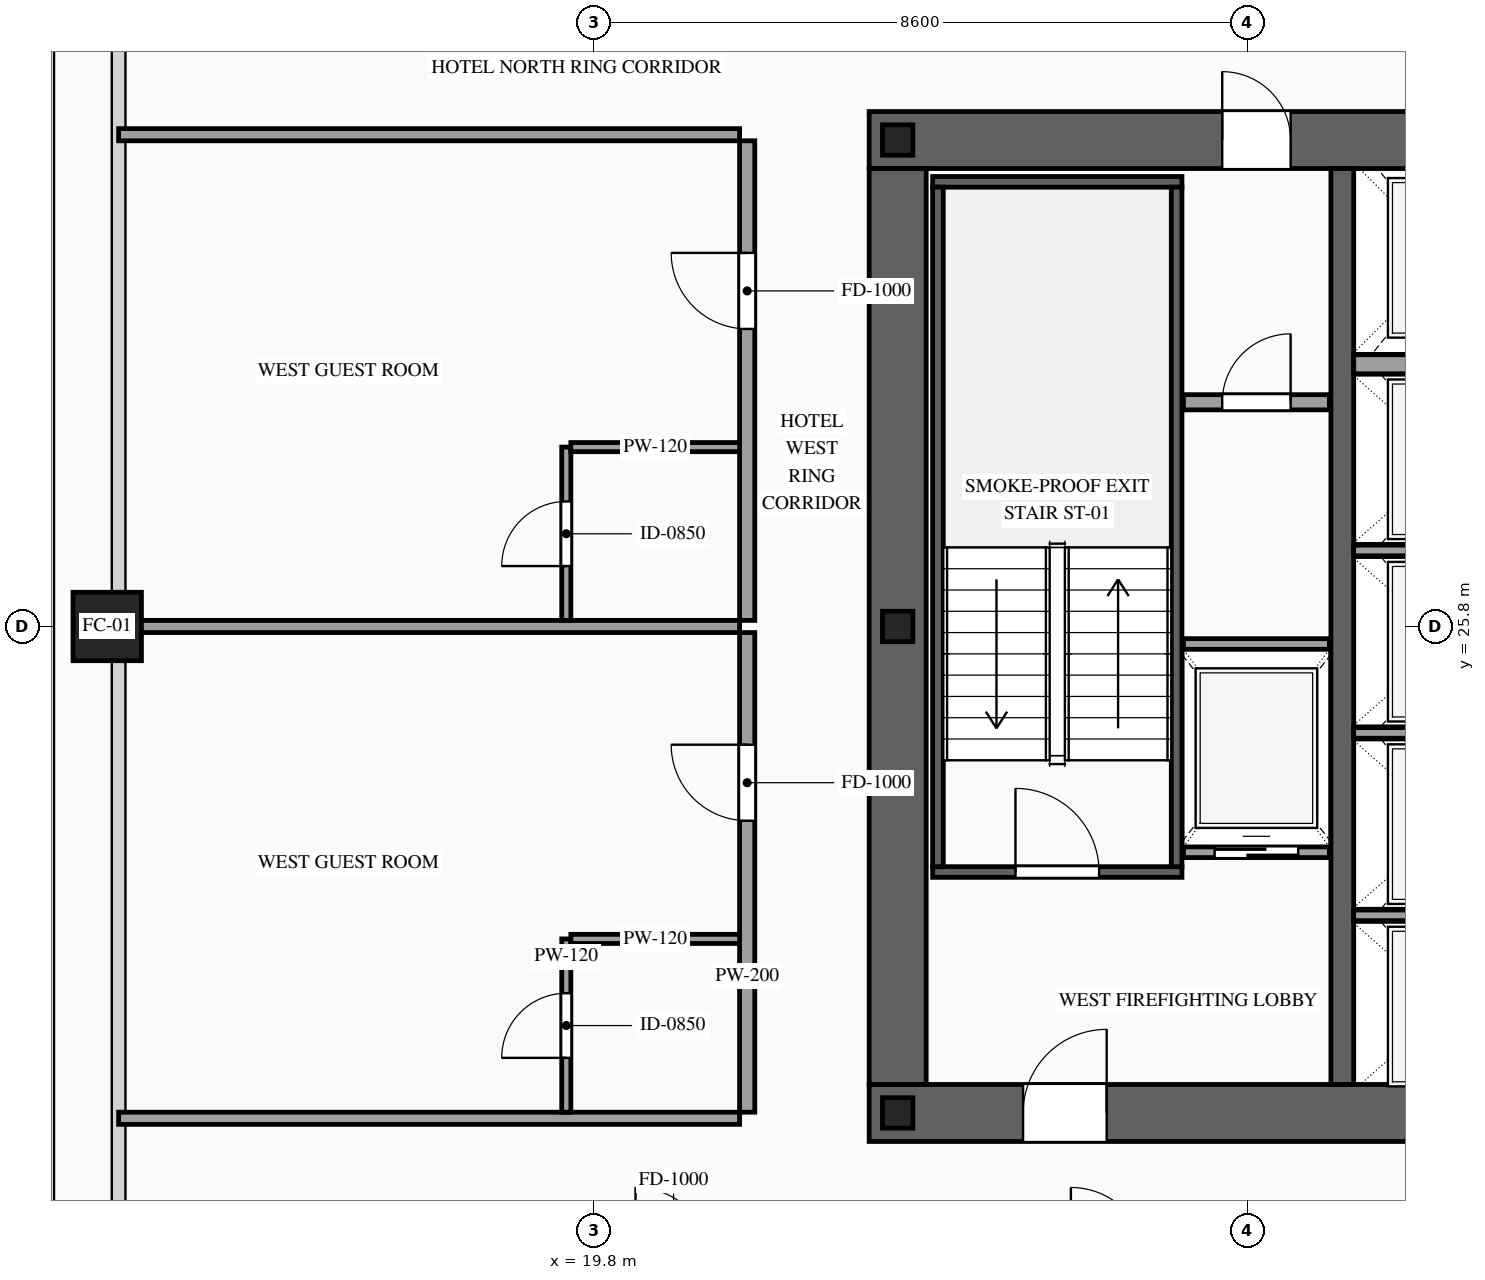
"""IFC4 building model, lengths in metres.
Left out: names, types, materials, properties, quantities, classifications, styles, units other than length and angle.
Written with IfcOpenShell. Run it as: python <this file> out.ifc"""

import sys

from ifc_helpers import new_model, si_unit, direction, frame, frame_2d, origin, origin_2d, place, context, subcontext, project, spatial, rectangle, hollow_rectangle, i_section, extrude, source, transform, mapped, element, fill, save


model = new_model("IFC4")
c1 = context("Model", 3, precision=1e-05, world=origin(), true_north=direction((0.0, 1.0)))
c2 = subcontext(c1, "Body", "Model", "MODEL_VIEW")
j1 = project(units=[si_unit("LENGTHUNIT", "METRE"), si_unit("PLANEANGLEUNIT", "RADIAN")], contexts=[c1])
p1 = place(None, origin())
s1 = spatial("IfcSite", under=j1, at=p1, CompositionType="ELEMENT")
p2 = place(p1, origin())
s2 = spatial("IfcBuilding", under=s1, at=p2, CompositionType="ELEMENT")
p3 = place(p2, frame((0.0, 0.0, 163.2)))
s3 = spatial("IfcBuildingStorey", under=s2, at=p3, CompositionType="ELEMENT", Elevation=163.2)
p4 = place(p3, frame((23.425, 19.4, 0.0), z_axis=(0.0, 0.0, 1.0), x_axis=(1.0, 0.0, 0.0)))
e1 = element("IfcWall", 1, at=p4, inside=s3, PredefinedType="SHEAR", context=c2, shape_type="SweptSolid", body=[
    extrude(rectangle(XDim=27.15, YDim=0.75, at=frame_2d((13.575, 0.0))), origin(), (0.0, 0.0, 1.0), 3.6),
])
p5 = place(p4, frame((2.025, 0.0, 0.0)))
e2 = element("IfcOpeningElement", 2, at=p5, cuts=e1, PredefinedType="OPENING", context=c2, shape_type="SweptSolid", body=[
    extrude(rectangle(XDim=1.1, YDim=2.2, at=frame_2d((0.55, 1.1))), frame((0.0, 0.39, 0.0), z_axis=(0.0, -1.0, 0.0), x_axis=(1.0, 0.0, 0.0)), (0.0, 0.0, 1.0), 0.78),
])
p6 = place(p4, frame((9.925, 0.0, 0.0)))
e3 = element("IfcOpeningElement", 3, at=p6, cuts=e1, PredefinedType="OPENING", context=c2, shape_type="SweptSolid", body=[
    extrude(rectangle(XDim=1.1, YDim=2.2, at=frame_2d((0.55, 1.1))), frame((0.0, 0.39, 0.0), z_axis=(0.0, -1.0, 0.0), x_axis=(1.0, 0.0, 0.0)), (0.0, 0.0, 1.0), 0.78),
])
p7 = place(p4, frame((23.125, 0.0, 0.0)))
e4 = element("IfcOpeningElement", 4, at=p7, cuts=e1, PredefinedType="OPENING", context=c2, shape_type="SweptSolid", body=[
    extrude(rectangle(XDim=1.1, YDim=2.2, at=frame_2d((0.55, 1.1))), frame((0.0, 0.39, 0.0), z_axis=(0.0, -1.0, 0.0), x_axis=(1.0, 0.0, 0.0)), (0.0, 0.0, 1.0), 0.78),
])
p8 = place(p4, frame((19.745, 0.0, 0.0)))
e5 = element("IfcOpeningElement", 5, at=p8, cuts=e1, PredefinedType="OPENING", context=c2, shape_type="SweptSolid", body=[
    extrude(rectangle(XDim=0.9, YDim=2.15, at=frame_2d((0.45, 1.075))), frame((0.0, 0.39, 0.0), z_axis=(0.0, -1.0, 0.0), x_axis=(1.0, 0.0, 0.0)), (0.0, 0.0, 1.0), 0.78),
])
p9 = place(p4, frame((18.305, 0.0, 0.0)))
e6 = element("IfcOpeningElement", 6, at=p9, cuts=e1, PredefinedType="OPENING", context=c2, shape_type="SweptSolid", body=[
    extrude(rectangle(XDim=0.9, YDim=2.15, at=frame_2d((0.45, 1.075))), frame((0.0, 0.39, 0.0), z_axis=(0.0, -1.0, 0.0), x_axis=(1.0, 0.0, 0.0)), (0.0, 0.0, 1.0), 0.78),
])
p10 = place(p3, frame((23.425, 32.2, 0.0), z_axis=(0.0, 0.0, 1.0), x_axis=(1.0, 0.0, 0.0)))
e7 = element("IfcWall", 7, at=p10, inside=s3, PredefinedType="SHEAR", context=c2, shape_type="SweptSolid", body=[
    extrude(rectangle(XDim=27.15, YDim=0.75, at=frame_2d((13.575, 0.0))), origin(), (0.0, 0.0, 1.0), 3.6),
])
p11 = place(p10, frame((4.645, 0.0, 0.0)))
e8 = element("IfcOpeningElement", 8, at=p11, cuts=e7, PredefinedType="OPENING", context=c2, shape_type="SweptSolid", body=[
    extrude(rectangle(XDim=0.9, YDim=2.15, at=frame_2d((0.45, 1.075))), frame((0.0, 0.39, 0.0), z_axis=(0.0, -1.0, 0.0), x_axis=(1.0, 0.0, 0.0)), (0.0, 0.0, 1.0), 0.78),
])
p12 = place(p10, frame((9.925, 0.0, 0.0)))
e9 = element("IfcOpeningElement", 9, at=p12, cuts=e7, PredefinedType="OPENING", context=c2, shape_type="SweptSolid", body=[
    extrude(rectangle(XDim=1.1, YDim=2.2, at=frame_2d((0.55, 1.1))), frame((0.0, 0.39, 0.0), z_axis=(0.0, -1.0, 0.0), x_axis=(1.0, 0.0, 0.0)), (0.0, 0.0, 1.0), 0.78),
])
p13 = place(p10, frame((15.775, 0.0, 0.0)))
e10 = element("IfcOpeningElement", 10, at=p13, cuts=e7, PredefinedType="OPENING", context=c2, shape_type="SweptSolid", body=[
    extrude(rectangle(XDim=1.1, YDim=2.2, at=frame_2d((0.55, 1.1))), frame((0.0, 0.39, 0.0), z_axis=(0.0, -1.0, 0.0), x_axis=(1.0, 0.0, 0.0)), (0.0, 0.0, 1.0), 0.78),
])
p14 = place(p10, frame((18.305, 0.0, 0.0)))
e11 = element("IfcOpeningElement", 11, at=p14, cuts=e7, PredefinedType="OPENING", context=c2, shape_type="SweptSolid", body=[
    extrude(rectangle(XDim=0.9, YDim=2.15, at=frame_2d((0.45, 1.075))), frame((0.0, 0.39, 0.0), z_axis=(0.0, -1.0, 0.0), x_axis=(1.0, 0.0, 0.0)), (0.0, 0.0, 1.0), 0.78),
])
p15 = place(p10, frame((19.745, 0.0, 0.0)))
e12 = element("IfcOpeningElement", 12, at=p15, cuts=e7, PredefinedType="OPENING", context=c2, shape_type="SweptSolid", body=[
    extrude(rectangle(XDim=0.9, YDim=2.15, at=frame_2d((0.45, 1.075))), frame((0.0, 0.39, 0.0), z_axis=(0.0, -1.0, 0.0), x_axis=(1.0, 0.0, 0.0)), (0.0, 0.0, 1.0), 0.78),
])
m1 = source(origin(), c2, "Body", "SweptSolid", [
    extrude(rectangle(XDim=12.05, YDim=0.75, at=frame_2d((6.025, 0.0))), origin(), (0.0, 0.0, 1.0), 3.6),
])
p16 = place(p3, frame((23.8, 19.775, 0.0), z_axis=(0.0, 0.0, 1.0), x_axis=(0.0, 1.0, 0.0)))
e13 = element("IfcWall", 13, at=p16, inside=s3, PredefinedType="SHEAR", context=c2, shape_type="MappedRepresentation", body=[
    mapped(m1, transform((0.0, 0.0, 0.0), scale=1.0)),
])
m2 = source(origin(), c2, "Body", "SweptSolid", [
    extrude(rectangle(XDim=12.05, YDim=0.3, at=frame_2d((6.025, 0.0))), origin(), (0.0, 0.0, 1.0), 3.6),
])
p17 = place(p3, frame((29.65, 19.775, 0.0), z_axis=(0.0, 0.0, 1.0), x_axis=(0.0, 1.0, 0.0)))
e14 = element("IfcWall", 14, at=p17, inside=s3, PredefinedType="SOLIDWALL", context=c2, shape_type="MappedRepresentation", body=[
    mapped(m2, transform((0.0, 0.0, 0.0), scale=1.0)),
])
m3 = source(origin(), c2, "Body", "SweptSolid", [
    extrude(i_section(OverallWidth=0.4, OverallDepth=0.4, WebThickness=0.013, FlangeThickness=0.021, at=origin_2d()), origin(), (0.0, 0.0, 1.0), 3.6),
])
for number, where, z_axis, x_axis in (
    (15, (23.8, 19.4, 0.0), (0.0, 0.0, 1.0), (1.0, 0.0, 0.0)),
    (16, (23.8, 25.8, 0.0), (0.0, 0.0, 1.0), (1.0, 0.0, 0.0)),
    (17, (23.8, 32.2, 0.0), (0.0, 0.0, 1.0), (1.0, 0.0, 0.0)),
):
    element("IfcColumn", number, at=place(p3, frame(where, z_axis=z_axis, x_axis=x_axis)), inside=s3, PredefinedType="COLUMN", context=c2, shape_type="MappedRepresentation", body=[
        mapped(m3, transform((0.0, 0.0, 0.0), scale=1.0)),
    ])
m4 = source(origin(), c2, "Body", "SweptSolid", [
    extrude(hollow_rectangle(XDim=0.9, YDim=0.9, WallThickness=0.042, at=origin_2d()), origin(), (0.0, 0.0, 1.0), 3.3),
])
p18 = place(p3, frame((13.4, 25.8, 0.0), z_axis=(0.0, 0.0, 1.0), x_axis=(1.0, 0.0, 0.0)))
e18 = element("IfcColumn", 18, at=p18, inside=s3, PredefinedType="COLUMN", context=c2, shape_type="MappedRepresentation", body=[
    mapped(m4, transform((0.0, 0.0, 0.0), scale=1.0)),
])
p19 = place(p3, frame((27.56, 22.83, 0.0), z_axis=(0.0, 0.0, 1.0), x_axis=(1.0, 0.0, 0.0)))
e19 = element("IfcWall", 19, at=p19, inside=s3, PredefinedType="SOLIDWALL", context=c2, shape_type="SweptSolid", body=[
    extrude(rectangle(XDim=1.92, YDim=0.14, at=frame_2d((0.96, 0.0))), origin(), (0.0, 0.0, 1.0), 3.3),
])
p20 = place(p19, frame((0.41, 0.0, 0.0)))
e20 = element("IfcOpeningElement", 20, at=p20, cuts=e19, PredefinedType="OPENING", context=c2, shape_type="SweptSolid", body=[
    extrude(rectangle(XDim=1.1, YDim=2.2, at=frame_2d((0.55, 1.1))), frame((0.0, 0.085, 0.0), z_axis=(0.0, -1.0, 0.0), x_axis=(1.0, 0.0, 0.0)), (0.0, 0.0, 1.0), 0.17),
])
m5 = source(origin(), c2, "Body", "SweptSolid", [
    extrude(rectangle(XDim=1.92, YDim=0.14, at=frame_2d((0.96, 0.0))), origin(), (0.0, 0.0, 1.0), 3.3),
])
p21 = place(p3, frame((27.56, 25.57, 0.0), z_axis=(0.0, 0.0, 1.0), x_axis=(1.0, 0.0, 0.0)))
e21 = element("IfcWall", 21, at=p21, inside=s3, PredefinedType="SOLIDWALL", context=c2, shape_type="MappedRepresentation", body=[
    mapped(m5, transform((0.0, 0.0, 0.0), scale=1.0)),
])
m6 = source(origin(), c2, "Body", "SweptSolid", [
    extrude(rectangle(XDim=2.5, YDim=0.14, at=frame_2d((1.25, 0.0))), origin(), (0.0, 0.0, 1.0), 3.3),
])
for number, where, z_axis, x_axis in (
    (22, (29.8, 22.0, 0.0), (0.0, 0.0, 1.0), (1.0, 0.0, 0.0)),
    (23, (29.8, 24.4, 0.0), (0.0, 0.0, 1.0), (1.0, 0.0, 0.0)),
    (24, (29.8, 26.8, 0.0), (0.0, 0.0, 1.0), (1.0, 0.0, 0.0)),
):
    element("IfcWall", number, at=place(p3, frame(where, z_axis=z_axis, x_axis=x_axis)), inside=s3, PredefinedType="SOLIDWALL", context=c2, shape_type="MappedRepresentation", body=[
        mapped(m6, transform((0.0, 0.0, 0.0), scale=1.0)),
    ])
m7 = source(origin(), c2, "Body", "SweptSolid", [
    extrude(rectangle(XDim=2.5, YDim=0.25, at=frame_2d((1.25, 0.0))), origin(), (0.0, 0.0, 1.0), 3.3),
])
p22 = place(p3, frame((29.8, 29.25, 0.0), z_axis=(0.0, 0.0, 1.0), x_axis=(1.0, 0.0, 0.0)))
e25 = element("IfcWall", 25, at=p22, inside=s3, PredefinedType="SOLIDWALL", context=c2, shape_type="MappedRepresentation", body=[
    mapped(m7, transform((0.0, 0.0, 0.0), scale=1.0)),
])
p23 = place(p3, frame((24.26, 22.57, 0.0), z_axis=(0.0, 0.0, 1.0), x_axis=(1.0, 0.0, 0.0)))
e26 = element("IfcWall", 26, at=p23, inside=s3, PredefinedType="SOLIDWALL", context=c2, shape_type="SweptSolid", body=[
    extrude(rectangle(XDim=3.28, YDim=0.14, at=frame_2d((1.64, 0.0))), origin(), (0.0, 0.0, 1.0), 3.3),
])
p24 = place(p23, frame((1.09, 0.0, 0.0)))
e27 = element("IfcOpeningElement", 27, at=p24, cuts=e26, PredefinedType="OPENING", context=c2, shape_type="SweptSolid", body=[
    extrude(rectangle(XDim=1.1, YDim=2.2, at=frame_2d((0.55, 1.1))), frame((0.0, 0.085, 0.0), z_axis=(0.0, -1.0, 0.0), x_axis=(1.0, 0.0, 0.0)), (0.0, 0.0, 1.0), 0.17),
])
m8 = source(origin(), c2, "Body", "SweptSolid", [
    extrude(rectangle(XDim=3.28, YDim=0.14, at=frame_2d((1.64, 0.0))), origin(), (0.0, 0.0, 1.0), 3.3),
])
p25 = place(p3, frame((24.26, 31.65, 0.0), z_axis=(0.0, 0.0, 1.0), x_axis=(1.0, 0.0, 0.0)))
e28 = element("IfcWall", 28, at=p25, inside=s3, PredefinedType="SOLIDWALL", context=c2, shape_type="MappedRepresentation", body=[
    mapped(m8, transform((0.0, 0.0, 0.0), scale=1.0)),
])
m9 = source(origin(), c2, "Body", "SweptSolid", [
    extrude(rectangle(XDim=8.94, YDim=0.14, at=frame_2d((4.47, 0.0))), origin(), (0.0, 0.0, 1.0), 3.3),
])
for number, where, z_axis, x_axis in (
    (29, (24.33, 22.64, 0.0), (0.0, 0.0, 1.0), (0.0, 1.0, 0.0)),
    (30, (27.47, 22.64, 0.0), (0.0, 0.0, 1.0), (0.0, 1.0, 0.0)),
):
    element("IfcWall", number, at=place(p3, frame(where, z_axis=z_axis, x_axis=x_axis)), inside=s3, PredefinedType="SOLIDWALL", context=c2, shape_type="MappedRepresentation", body=[
        mapped(m9, transform((0.0, 0.0, 0.0), scale=1.0)),
    ])
p26 = place(p3, frame((27.56, 28.75, 0.0), z_axis=(0.0, 0.0, 1.0), x_axis=(1.0, 0.0, 0.0)))
e31 = element("IfcWall", 31, at=p26, inside=s3, PredefinedType="PARTITIONING", context=c2, shape_type="SweptSolid", body=[
    extrude(rectangle(XDim=1.92, YDim=0.2, at=frame_2d((0.96, 0.0))), origin(), (0.0, 0.0, 1.0), 3.3),
])
p27 = place(p26, frame((0.51, 0.0, 0.0)))
e32 = element("IfcOpeningElement", 32, at=p27, cuts=e31, PredefinedType="OPENING", context=c2, shape_type="SweptSolid", body=[
    extrude(rectangle(XDim=0.9, YDim=2.15, at=frame_2d((0.45, 1.075))), frame((0.0, 0.115, 0.0), z_axis=(0.0, -1.0, 0.0), x_axis=(1.0, 0.0, 0.0)), (0.0, 0.0, 1.0), 0.23),
])
p28 = place(p3, frame((21.82, 19.41, 0.0), z_axis=(0.0, 0.0, 1.0), x_axis=(0.0, 1.0, 0.0)))
e33 = element("IfcWall", 33, at=p28, inside=s3, PredefinedType="PARTITIONING", context=c2, shape_type="SweptSolid", body=[
    extrude(rectangle(XDim=6.31, YDim=0.2, at=frame_2d((3.155, 0.0))), origin(), (0.0, 0.0, 1.0), 3.3),
])
p29 = place(p28, frame((3.835, 0.0, 0.0)))
e34 = element("IfcOpeningElement", 34, at=p29, cuts=e33, PredefinedType="OPENING", context=c2, shape_type="SweptSolid", body=[
    extrude(rectangle(XDim=1.0, YDim=2.2, at=frame_2d((0.5, 1.1))), frame((0.0, 0.115, 0.0), z_axis=(0.0, -1.0, 0.0), x_axis=(1.0, 0.0, 0.0)), (0.0, 0.0, 1.0), 0.23),
])
m10 = source(origin(), c2, "Body", "SweptSolid", [
    extrude(rectangle(XDim=8.17, YDim=0.16, at=frame_2d((4.085, 0.0))), origin(), (0.0, 0.0, 1.0), 1.695),
])
p30 = place(p3, frame((13.55, 25.8, 0.0), z_axis=(0.0, 0.0, 1.0), x_axis=(1.0, 0.0, 0.0)))
e35 = element("IfcWall", 35, at=p30, inside=s3, PredefinedType="PARTITIONING", context=c2, shape_type="MappedRepresentation", body=[
    mapped(m10, transform((0.0, 0.0, 0.0), scale=1.0)),
])
m11 = source(origin(), c2, "Body", "SweptSolid", [
    extrude(rectangle(XDim=8.17, YDim=0.16, at=frame_2d((4.085, 0.0))), origin(), (0.0, 0.0, 1.0), 3.3),
])
p31 = place(p3, frame((13.55, 19.33, 0.0), z_axis=(0.0, 0.0, 1.0), x_axis=(1.0, 0.0, 0.0)))
e36 = element("IfcWall", 36, at=p31, inside=s3, PredefinedType="PARTITIONING", context=c2, shape_type="MappedRepresentation", body=[
    mapped(m11, transform((0.0, 0.0, 0.0), scale=1.0)),
])
p32 = place(p3, frame((19.44, 19.41, 0.0), z_axis=(0.0, 0.0, 1.0), x_axis=(0.0, 1.0, 0.0)))
e37 = element("IfcWall", 37, at=p32, inside=s3, PredefinedType="PARTITIONING", context=c2, shape_type="SweptSolid", body=[
    extrude(rectangle(XDim=2.28, YDim=0.12, at=frame_2d((1.14, 0.0))), origin(), (0.0, 0.0, 1.0), 3.3),
])
p33 = place(p32, frame((0.715, 0.0, 0.0)))
e38 = element("IfcOpeningElement", 38, at=p33, cuts=e37, PredefinedType="OPENING", context=c2, shape_type="SweptSolid", body=[
    extrude(rectangle(XDim=0.85, YDim=2.1, at=frame_2d((0.425, 1.05))), frame((0.0, 0.075, 0.0), z_axis=(0.0, -1.0, 0.0), x_axis=(1.0, 0.0, 0.0)), (0.0, 0.0, 1.0), 0.15),
])
m12 = source(origin(), c2, "Body", "SweptSolid", [
    extrude(rectangle(XDim=2.22, YDim=0.12, at=frame_2d((1.11, 0.0))), origin(), (0.0, 0.0, 1.0), 3.3),
])
p34 = place(p3, frame((19.5, 21.69, 0.0), z_axis=(0.0, 0.0, 1.0), x_axis=(1.0, 0.0, 0.0)))
e39 = element("IfcWall", 39, at=p34, inside=s3, PredefinedType="PARTITIONING", context=c2, shape_type="MappedRepresentation", body=[
    mapped(m12, transform((0.0, 0.0, 0.0), scale=1.0)),
])
p35 = place(p3, frame((21.82, 25.88, 0.0), z_axis=(0.0, 0.0, 1.0), x_axis=(0.0, 1.0, 0.0)))
e40 = element("IfcWall", 40, at=p35, inside=s3, PredefinedType="PARTITIONING", context=c2, shape_type="SweptSolid", body=[
    extrude(rectangle(XDim=6.31, YDim=0.2, at=frame_2d((3.155, 0.0))), origin(), (0.0, 0.0, 1.0), 3.3),
])
p36 = place(p35, frame((3.835, 0.0, 0.0)))
e41 = element("IfcOpeningElement", 41, at=p36, cuts=e40, PredefinedType="OPENING", context=c2, shape_type="SweptSolid", body=[
    extrude(rectangle(XDim=1.0, YDim=2.2, at=frame_2d((0.5, 1.1))), frame((0.0, 0.115, 0.0), z_axis=(0.0, -1.0, 0.0), x_axis=(1.0, 0.0, 0.0)), (0.0, 0.0, 1.0), 0.23),
])
p37 = place(p3, frame((13.55, 32.27, 0.0), z_axis=(0.0, 0.0, 1.0), x_axis=(1.0, 0.0, 0.0)))
e42 = element("IfcWall", 42, at=p37, inside=s3, PredefinedType="PARTITIONING", context=c2, shape_type="MappedRepresentation", body=[
    mapped(m11, transform((0.0, 0.0, 0.0), scale=1.0)),
])
p38 = place(p3, frame((19.44, 25.88, 0.0), z_axis=(0.0, 0.0, 1.0), x_axis=(0.0, 1.0, 0.0)))
e43 = element("IfcWall", 43, at=p38, inside=s3, PredefinedType="PARTITIONING", context=c2, shape_type="SweptSolid", body=[
    extrude(rectangle(XDim=2.28, YDim=0.12, at=frame_2d((1.14, 0.0))), origin(), (0.0, 0.0, 1.0), 3.3),
])
p39 = place(p38, frame((0.715, 0.0, 0.0)))
e44 = element("IfcOpeningElement", 44, at=p39, cuts=e43, PredefinedType="OPENING", context=c2, shape_type="SweptSolid", body=[
    extrude(rectangle(XDim=0.85, YDim=2.1, at=frame_2d((0.425, 1.05))), frame((0.0, 0.075, 0.0), z_axis=(0.0, -1.0, 0.0), x_axis=(1.0, 0.0, 0.0)), (0.0, 0.0, 1.0), 0.15),
])
p40 = place(p3, frame((19.5, 28.16, 0.0), z_axis=(0.0, 0.0, 1.0), x_axis=(1.0, 0.0, 0.0)))
e45 = element("IfcWall", 45, at=p40, inside=s3, PredefinedType="PARTITIONING", context=c2, shape_type="MappedRepresentation", body=[
    mapped(m12, transform((0.0, 0.0, 0.0), scale=1.0)),
])
m13 = source(origin(), c2, "Body", "SweptSolid", [
    extrude(rectangle(XDim=1.1, YDim=2.2, at=frame_2d((0.55, 1.1))), frame((0.0, 0.025, 0.0), z_axis=(0.0, -1.0, 0.0), x_axis=(1.0, 0.0, 0.0)), (0.0, 0.0, 1.0), 0.05),
])
p41 = place(p20, origin())
e46 = element("IfcDoor", 46, at=p41, inside=s3, OperationType="SLIDING_TO_LEFT", PredefinedType="DOOR", context=c2, shape_type="MappedRepresentation", body=[
    mapped(m13, transform((0.0, 0.0, 0.0), scale=1.0)),
])
fill(e20, e46)
m14 = source(origin(), c2, "Body", "SweptSolid", [
    extrude(rectangle(XDim=1.1, YDim=2.2, at=frame_2d((0.55, 1.1))), frame((0.0, 0.025, 0.0), z_axis=(0.0, -1.0, 0.0), x_axis=(1.0, 0.0, 0.0)), (0.0, 0.0, 1.0), 0.05),
])
p42 = place(p24, origin())
e47 = element("IfcDoor", 47, at=p42, inside=s3, OperationType="SINGLE_SWING_LEFT", PredefinedType="DOOR", context=c2, shape_type="MappedRepresentation", body=[
    mapped(m14, transform((0.0, 0.0, 0.0), scale=1.0)),
])
fill(e27, e47)
p43 = place(p5, origin())
e48 = element("IfcDoor", 48, at=p43, inside=s3, OperationType="SINGLE_SWING_RIGHT", PredefinedType="DOOR", context=c2, shape_type="MappedRepresentation", body=[
    mapped(m14, transform((0.0, 0.0, 0.0), scale=1.0)),
])
fill(e2, e48)
m15 = source(origin(), c2, "Body", "SweptSolid", [
    extrude(rectangle(XDim=0.9, YDim=2.15, at=frame_2d((0.45, 1.075))), frame((0.0, 0.025, 0.0), z_axis=(0.0, -1.0, 0.0), x_axis=(1.0, 0.0, 0.0)), (0.0, 0.0, 1.0), 0.05),
])
p44 = place(p11, origin())
e49 = element("IfcDoor", 49, at=p44, inside=s3, OperationType="SINGLE_SWING_LEFT", PredefinedType="DOOR", context=c2, shape_type="MappedRepresentation", body=[
    mapped(m15, transform((0.0, 0.0, 0.0), scale=1.0)),
])
fill(e8, e49)
p45 = place(p27, origin())
e50 = element("IfcDoor", 50, at=p45, inside=s3, OperationType="SINGLE_SWING_RIGHT", PredefinedType="DOOR", context=c2, shape_type="MappedRepresentation", body=[
    mapped(m15, transform((0.0, 0.0, 0.0), scale=1.0)),
])
fill(e32, e50)
m16 = source(origin(), c2, "Body", "SweptSolid", [
    extrude(rectangle(XDim=1.0, YDim=2.2, at=frame_2d((0.5, 1.1))), frame((0.0, 0.025, 0.0), z_axis=(0.0, -1.0, 0.0), x_axis=(1.0, 0.0, 0.0)), (0.0, 0.0, 1.0), 0.05),
])
p46 = place(p29, origin())
e51 = element("IfcDoor", 51, at=p46, inside=s3, OperationType="SINGLE_SWING_RIGHT", PredefinedType="DOOR", context=c2, shape_type="MappedRepresentation", body=[
    mapped(m16, transform((0.0, 0.0, 0.0), scale=1.0)),
])
fill(e34, e51)
m17 = source(origin(), c2, "Body", "SweptSolid", [
    extrude(rectangle(XDim=0.85, YDim=2.1, at=frame_2d((0.425, 1.05))), frame((0.0, 0.025, 0.0), z_axis=(0.0, -1.0, 0.0), x_axis=(1.0, 0.0, 0.0)), (0.0, 0.0, 1.0), 0.05),
])
p47 = place(p33, origin())
e52 = element("IfcDoor", 52, at=p47, inside=s3, OperationType="SINGLE_SWING_LEFT", PredefinedType="DOOR", context=c2, shape_type="MappedRepresentation", body=[
    mapped(m17, transform((0.0, 0.0, 0.0), scale=1.0)),
])
fill(e38, e52)
p48 = place(p36, origin())
e53 = element("IfcDoor", 53, at=p48, inside=s3, OperationType="SINGLE_SWING_RIGHT", PredefinedType="DOOR", context=c2, shape_type="MappedRepresentation", body=[
    mapped(m16, transform((0.0, 0.0, 0.0), scale=1.0)),
])
fill(e41, e53)
p49 = place(p39, origin())
e54 = element("IfcDoor", 54, at=p49, inside=s3, OperationType="SINGLE_SWING_LEFT", PredefinedType="DOOR", context=c2, shape_type="MappedRepresentation", body=[
    mapped(m17, transform((0.0, 0.0, 0.0), scale=1.0)),
])
fill(e44, e54)
save(model, sys.argv[1])
